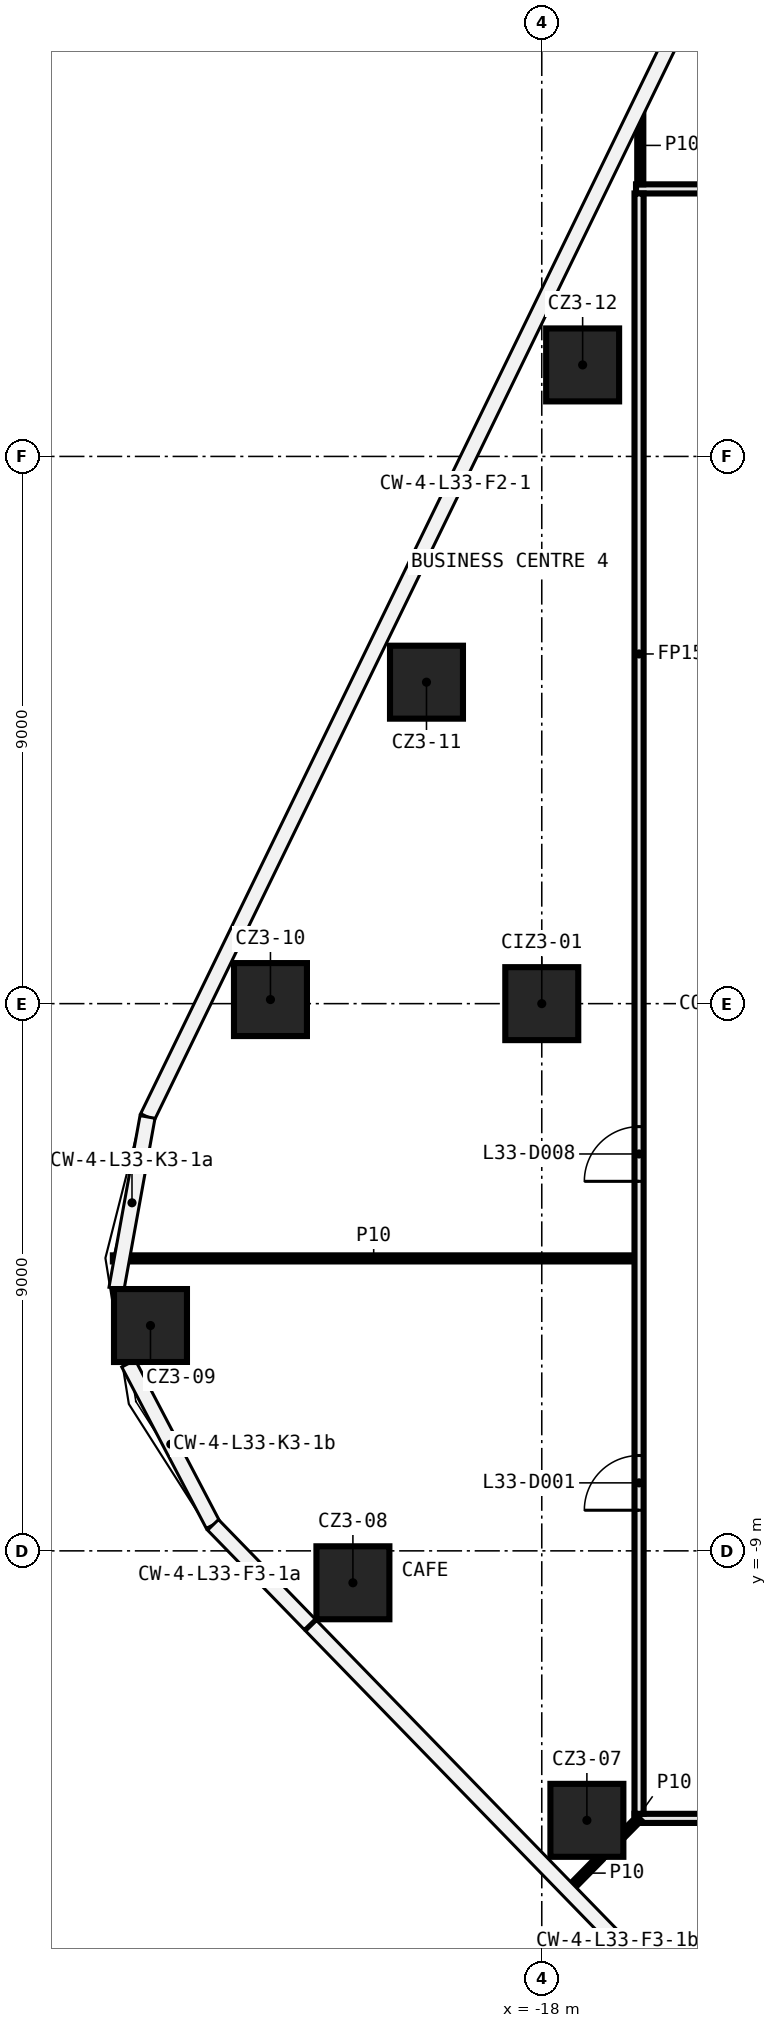
"""IFC4 building model, lengths in metres.
Left out: names, types, materials, properties, quantities, classifications, styles, units other than length and angle.
Written with IfcOpenShell. Run it as: python <this file> out.ifc"""

import sys

from ifc_helpers import new_model, si_unit, direction, frame, frame_2d, origin, origin_2d, place, context, subcontext, project, spatial, rectangle, extrude, element, fill, save


model = new_model("IFC4")
c1 = context("Model", 3, precision=1e-05, world=origin(), true_north=direction((0.0, 1.0)))
c2 = subcontext(c1, "Body", "Model", "MODEL_VIEW")
j1 = project(units=[si_unit("LENGTHUNIT", "METRE"), si_unit("PLANEANGLEUNIT", "RADIAN")], contexts=[c1])
p1 = place(None, origin())
s1 = spatial("IfcSite", under=j1, at=p1, CompositionType="ELEMENT")
p2 = place(p1, origin())
s2 = spatial("IfcBuilding", under=s1, at=p2, CompositionType="ELEMENT")
p3 = place(p2, frame((0.0, 0.0, 151.6)))
s3 = spatial("IfcBuildingStorey", under=s2, at=p3, CompositionType="ELEMENT", Elevation=151.6)
for number, where, z_axis, x_axis in (
    (1, (-17.258, -13.432, 0.0), (0.0, 0.0, 1.0), (1.0, 0.0, 0.0)),
    (2, (-21.106, -9.525, 0.0), (0.0, 0.0, 1.0), (1.0, 0.0, 0.0)),
    (3, (-24.435, -5.294, 0.0), (0.0, 0.0, 1.0), (1.0, 0.0, 0.0)),
    (4, (-22.462, 0.067, 0.0), (0.0, 0.0, 1.0), (1.0, 0.0, 0.0)),
    (5, (-19.896, 5.287, 0.0), (0.0, 0.0, 1.0), (1.0, 0.0, 0.0)),
    (6, (-17.328, 10.505, 0.0), (0.0, 0.0, 1.0), (1.0, 0.0, 0.0)),
    (7, (-18.0, 0.0, 0.0), (0.0, 0.0, 1.0), (1.0, 0.0, 0.0)),
):
    element("IfcColumn", number, at=place(p3, frame(where, z_axis=z_axis, x_axis=x_axis)), inside=s3, PredefinedType="COLUMN", context=c2, shape_type="SweptSolid", body=[
        extrude(rectangle(XDim=1.2, YDim=1.2, at=origin_2d()), origin(), (0.0, 0.0, 1.0), 6.62),
    ])
p4 = place(p3, frame((16.475, -13.4, 0.0), z_axis=(0.0, 0.0, 1.0), x_axis=(-1.0, 0.0, 0.0)))
e8 = element("IfcWall", 8, at=p4, inside=s3, PredefinedType="PARTITIONING", context=c2, shape_type="SweptSolid", body=[
    extrude(rectangle(XDim=32.95, YDim=0.15, at=frame_2d((16.475, 0.0))), origin(), (0.0, 0.0, 1.0), 6.62),
])
p5 = place(p4, frame((22.568, 0.0, 0.0)))
e9 = element("IfcOpeningElement", 9, at=p5, cuts=e8, PredefinedType="OPENING", context=c2, shape_type="SweptSolid", body=[
    extrude(rectangle(XDim=0.9, YDim=2.1, at=frame_2d((0.45, 1.05))), frame((0.0, 0.085, 0.0), z_axis=(0.0, -1.0, 0.0), x_axis=(1.0, 0.0, 0.0)), (0.0, 0.0, 1.0), 0.17),
])
p6 = place(p4, frame((6.926, 0.0, 0.0)))
e10 = element("IfcOpeningElement", 10, at=p6, cuts=e8, PredefinedType="OPENING", context=c2, shape_type="SweptSolid", body=[
    extrude(rectangle(XDim=0.9, YDim=2.1, at=frame_2d((0.45, 1.05))), frame((0.0, 0.085, 0.0), z_axis=(0.0, -1.0, 0.0), x_axis=(1.0, 0.0, 0.0)), (0.0, 0.0, 1.0), 0.17),
])
p7 = place(p3, frame((-25.054, -4.19, 0.0), z_axis=(0.0, 0.0, 1.0), x_axis=(1.0, 0.0, 0.0)))
e11 = element("IfcWall", 11, at=p7, inside=s3, PredefinedType="PARTITIONING", context=c2, shape_type="SweptSolid", body=[
    extrude(rectangle(XDim=8.579, YDim=0.1, at=frame_2d((4.289, 0.0))), origin(), (0.0, 0.0, 1.0), 6.62),
])
p8 = place(p3, frame((-16.45, 13.4, 0.0), z_axis=(0.0, 0.0, 1.0), x_axis=(1.0, 0.0, 0.0)))
e12 = element("IfcWall", 12, at=p8, inside=s3, PredefinedType="PARTITIONING", context=c2, shape_type="SweptSolid", body=[
    extrude(rectangle(XDim=32.925, YDim=0.15, at=frame_2d((16.462, 0.0))), origin(), (0.0, 0.0, 1.0), 6.62),
])
p9 = place(p8, frame((23.018, 0.0, 0.0)))
e13 = element("IfcOpeningElement", 13, at=p9, cuts=e12, PredefinedType="OPENING", context=c2, shape_type="SweptSolid", body=[
    extrude(rectangle(XDim=0.9, YDim=2.1, at=frame_2d((0.45, 1.05))), frame((0.0, 0.085, 0.0), z_axis=(0.0, -1.0, 0.0), x_axis=(1.0, 0.0, 0.0)), (0.0, 0.0, 1.0), 0.17),
])
p10 = place(p8, frame((6.927, 0.0, 0.0)))
e14 = element("IfcOpeningElement", 14, at=p10, cuts=e12, PredefinedType="OPENING", context=c2, shape_type="SweptSolid", body=[
    extrude(rectangle(XDim=0.9, YDim=2.1, at=frame_2d((0.45, 1.05))), frame((0.0, 0.085, 0.0), z_axis=(0.0, -1.0, 0.0), x_axis=(1.0, 0.0, 0.0)), (0.0, 0.0, 1.0), 0.17),
])
p11 = place(p3, frame((-17.55, -14.568, 0.0), z_axis=(0.0, 0.0, 1.0), x_axis=(0.701568764215, 0.712601760507, 0.0)))
e15 = element("IfcWall", 15, at=p11, inside=s3, PredefinedType="PARTITIONING", context=c2, shape_type="SweptSolid", body=[
    extrude(rectangle(XDim=0.752, YDim=0.1, at=frame_2d((0.376, 0.0))), origin(), (0.0, 0.0, 1.0), 6.62),
])
p12 = place(p3, frame((-16.658, -13.662, 0.0), z_axis=(0.0, 0.0, 1.0), x_axis=(0.701770352778, 0.712403236911, 0.0)))
e16 = element("IfcWall", 16, at=p12, inside=s3, PredefinedType="PARTITIONING", context=c2, shape_type="SweptSolid", body=[
    extrude(rectangle(XDim=0.367, YDim=0.1, at=frame_2d((0.184, 0.0))), origin(), (0.0, 0.0, 1.0), 6.62),
])
p13 = place(p3, frame((-16.38, 13.475, 0.0), z_axis=(0.0, 0.0, 1.0), x_axis=(0.0, 1.0, 0.0)))
e17 = element("IfcWall", 17, at=p13, inside=s3, PredefinedType="PARTITIONING", context=c2, shape_type="SweptSolid", body=[
    extrude(rectangle(XDim=1.281, YDim=0.1, at=frame_2d((0.64, 0.0))), origin(), (0.0, 0.0, 1.0), 6.62),
])
p14 = place(p3, frame((-16.4, -13.325, 0.0), z_axis=(0.0, 0.0, 1.0), x_axis=(0.0, 1.0, 0.0)))
e18 = element("IfcWall", 18, at=p14, inside=s3, PredefinedType="PARTITIONING", context=c2, shape_type="SweptSolid", body=[
    extrude(rectangle(XDim=26.65, YDim=0.15, at=frame_2d((13.325, 0.0))), origin(), (0.0, 0.0, 1.0), 6.62),
])
p15 = place(p14, frame((4.993, 0.0, 0.0)))
e19 = element("IfcOpeningElement", 19, at=p15, cuts=e18, PredefinedType="OPENING", context=c2, shape_type="SweptSolid", body=[
    extrude(rectangle(XDim=0.9, YDim=2.1, at=frame_2d((0.45, 1.05))), frame((0.0, 0.085, 0.0), z_axis=(0.0, -1.0, 0.0), x_axis=(1.0, 0.0, 0.0)), (0.0, 0.0, 1.0), 0.17),
])
p16 = place(p14, frame((10.403, 0.0, 0.0)))
e20 = element("IfcOpeningElement", 20, at=p16, cuts=e18, PredefinedType="OPENING", context=c2, shape_type="SweptSolid", body=[
    extrude(rectangle(XDim=0.9, YDim=2.1, at=frame_2d((0.45, 1.05))), frame((0.0, 0.085, 0.0), z_axis=(0.0, -1.0, 0.0), x_axis=(1.0, 0.0, 0.0)), (0.0, 0.0, 1.0), 0.17),
])
p17 = place(p15, origin())
e21 = element("IfcDoor", 21, at=p17, inside=s3, OperationType="SINGLE_SWING_RIGHT", PredefinedType="DOOR", context=c2, shape_type="SweptSolid", body=[
    extrude(rectangle(XDim=0.9, YDim=2.1, at=frame_2d((0.45, 1.05))), frame((0.0, 0.025, 0.0), z_axis=(0.0, -1.0, 0.0), x_axis=(1.0, 0.0, 0.0)), (0.0, 0.0, 1.0), 0.05),
])
fill(e19, e21)
p18 = place(p16, origin())
e22 = element("IfcDoor", 22, at=p18, inside=s3, OperationType="SINGLE_SWING_LEFT", PredefinedType="DOOR", context=c2, shape_type="SweptSolid", body=[
    extrude(rectangle(XDim=0.9, YDim=2.1, at=frame_2d((0.45, 1.05))), frame((0.0, 0.025, 0.0), z_axis=(0.0, -1.0, 0.0), x_axis=(1.0, 0.0, 0.0)), (0.0, 0.0, 1.0), 0.05),
])
fill(e20, e22)
save(model, sys.argv[1])
